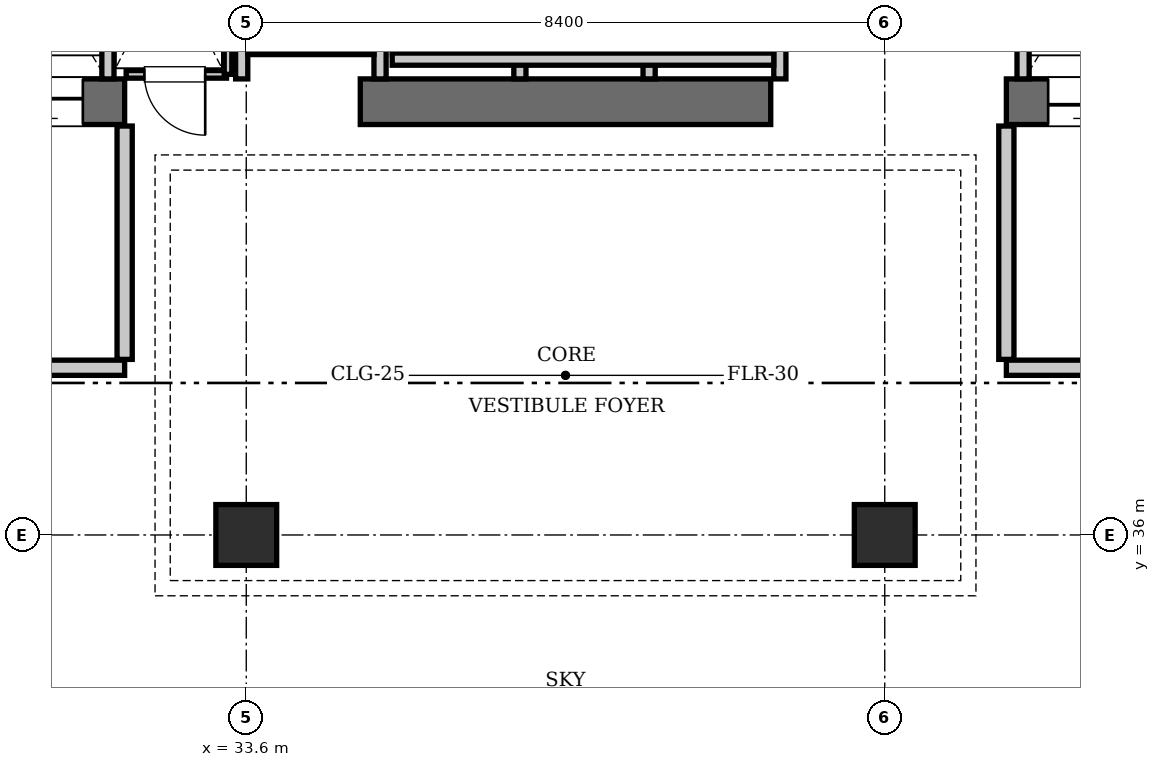
"""IFC4 building model, lengths in metres.
Left out: names, types, materials, properties, quantities, classifications, styles, units other than length and angle.
Written with IfcOpenShell. Run it as: python <this file> out.ifc"""

import sys

from ifc_helpers import new_model, si_unit, direction, frame, frame_2d, origin, origin_2d, place, context, subcontext, project, spatial, rectangle, extrude, element, fill, save


model = new_model("IFC4")
c1 = context("Model", 3, precision=1e-05, world=origin(), true_north=direction((0.0, 1.0)))
c2 = subcontext(c1, "Body", "Model", "MODEL_VIEW")
j1 = project(units=[si_unit("LENGTHUNIT", "METRE"), si_unit("PLANEANGLEUNIT", "RADIAN")], contexts=[c1])
p1 = place(None, origin())
s1 = spatial("IfcSite", under=j1, at=p1, CompositionType="ELEMENT")
p2 = place(p1, origin())
s2 = spatial("IfcBuilding", under=s1, at=p2, CompositionType="ELEMENT")
p3 = place(p2, frame((0.0, 0.0, 234.5)))
s3 = spatial("IfcBuildingStorey", under=s2, at=p3, CompositionType="ELEMENT", Elevation=234.5)
p4 = place(p3, frame((25.2, 41.7, 0.0), z_axis=(0.0, 0.0, 1.0), x_axis=(1.0, 0.0, 0.0)))
e1 = element("IfcWall", 1, at=p4, inside=s3, PredefinedType="SHEAR", context=c2, shape_type="SweptSolid", body=[
    extrude(rectangle(XDim=6.8, YDim=0.6, at=frame_2d((3.4, 0.0))), origin(), (0.0, 0.0, 1.0), 4.9),
])
p5 = place(p4, frame((1.65, 0.0, 0.0)))
e2 = element("IfcOpeningElement", 2, at=p5, cuts=e1, PredefinedType="OPENING", context=c2, shape_type="SweptSolid", body=[
    extrude(rectangle(XDim=1.15, YDim=2.15, at=frame_2d((0.575, 1.075))), frame((0.0, 0.31, 0.0), z_axis=(0.0, -1.0, 0.0), x_axis=(1.0, 0.0, 0.0)), (0.0, 0.0, 1.0), 0.62),
])
p6 = place(p4, frame((5.15, 0.0, 0.0)))
e3 = element("IfcOpeningElement", 3, at=p6, cuts=e1, PredefinedType="OPENING", context=c2, shape_type="SweptSolid", body=[
    extrude(rectangle(XDim=1.1, YDim=2.2, at=frame_2d((0.55, 1.1))), frame((0.0, 0.31, 0.0), z_axis=(0.0, -1.0, 0.0), x_axis=(1.0, 0.0, 0.0)), (0.0, 0.0, 1.0), 0.62),
])
p7 = place(p3, frame((35.1, 41.7, 0.0), z_axis=(0.0, 0.0, 1.0), x_axis=(1.0, 0.0, 0.0)))
e4 = element("IfcWall", 4, at=p7, inside=s3, PredefinedType="SHEAR", context=c2, shape_type="SweptSolid", body=[
    extrude(rectangle(XDim=5.4, YDim=0.6, at=frame_2d((2.7, 0.0))), origin(), (0.0, 0.0, 1.0), 4.9),
])
p8 = place(p3, frame((43.6, 41.7, 0.0), z_axis=(0.0, 0.0, 1.0), x_axis=(1.0, 0.0, 0.0)))
e5 = element("IfcWall", 5, at=p8, inside=s3, PredefinedType="SHEAR", context=c2, shape_type="SweptSolid", body=[
    extrude(rectangle(XDim=6.8, YDim=0.6, at=frame_2d((3.4, 0.0))), origin(), (0.0, 0.0, 1.0), 4.9),
])
p9 = place(p8, frame((3.9, 0.0, 0.0)))
e6 = element("IfcOpeningElement", 6, at=p9, cuts=e5, PredefinedType="OPENING", context=c2, shape_type="SweptSolid", body=[
    extrude(rectangle(XDim=1.15, YDim=2.15, at=frame_2d((0.575, 1.075))), frame((0.0, 0.31, 0.0), z_axis=(0.0, -1.0, 0.0), x_axis=(1.0, 0.0, 0.0)), (0.0, 0.0, 1.0), 0.62),
])
p10 = place(p8, frame((0.55, 0.0, 0.0)))
e7 = element("IfcOpeningElement", 7, at=p10, cuts=e5, PredefinedType="OPENING", context=c2, shape_type="SweptSolid", body=[
    extrude(rectangle(XDim=1.1, YDim=2.2, at=frame_2d((0.55, 1.1))), frame((0.0, 0.31, 0.0), z_axis=(0.0, -1.0, 0.0), x_axis=(1.0, 0.0, 0.0)), (0.0, 0.0, 1.0), 0.62),
])
for number, where, z_axis, x_axis in (
    (8, (33.6, 36.0, 0.0), (0.0, 0.0, 1.0), (1.0, 0.0, 0.0)),
    (9, (42.0, 36.0, 0.0), (0.0, 0.0, 1.0), (1.0, 0.0, 0.0)),
):
    element("IfcColumn", number, at=place(p3, frame(where, z_axis=z_axis, x_axis=x_axis)), inside=s3, PredefinedType="COLUMN", context=c2, shape_type="SweptSolid", body=[
        extrude(rectangle(XDim=0.8, YDim=0.8, at=origin_2d()), origin(), (0.0, 0.0, 1.0), 4.9),
    ])
for number, where, z_axis, x_axis in (
    (10, (31.78, 42.0, 0.0), (0.0, 0.0, 1.0), (0.0, 1.0, 0.0)),
    (11, (43.82, 42.0, 0.0), (0.0, 0.0, 1.0), (0.0, 1.0, 0.0)),
):
    element("IfcWall", number, at=place(p3, frame(where, z_axis=z_axis, x_axis=x_axis)), inside=s3, PredefinedType="SOLIDWALL", context=c2, shape_type="SweptSolid", body=[
        extrude(rectangle(XDim=2.74, YDim=0.16, at=frame_2d((1.37, 0.0))), origin(), (0.0, 0.0, 1.0), 4.66),
    ])
for number, where, z_axis, x_axis in (
    (12, (37.2, 42.0, 0.0), (0.0, 0.0, 1.0), (0.0, 1.0, 0.0)),
    (13, (38.9, 42.0, 0.0), (0.0, 0.0, 1.0), (0.0, 1.0, 0.0)),
    (14, (40.62, 42.0, 0.0), (0.0, 0.0, 1.0), (0.0, 1.0, 0.0)),
):
    element("IfcWall", number, at=place(p3, frame(where, z_axis=z_axis, x_axis=x_axis)), inside=s3, PredefinedType="SOLIDWALL", context=c2, shape_type="SweptSolid", body=[
        extrude(rectangle(XDim=2.35, YDim=0.16, at=frame_2d((1.175, 0.0))), origin(), (0.0, 0.0, 1.0), 4.66),
    ])
p11 = place(p3, frame((35.52, 42.26, 0.0), z_axis=(0.0, 0.0, 1.0), x_axis=(1.0, 0.0, 0.0)))
e15 = element("IfcWall", 15, at=p11, inside=s3, PredefinedType="SOLIDWALL", context=c2, shape_type="SweptSolid", body=[
    extrude(rectangle(XDim=5.02, YDim=0.16, at=frame_2d((2.51, 0.0))), origin(), (0.0, 0.0, 1.0), 4.66),
])
for number, where, z_axis, x_axis in (
    (16, (33.54, 42.0, 0.0), (0.0, 0.0, 1.0), (0.0, 1.0, 0.0)),
    (17, (35.36, 42.0, 0.0), (0.0, 0.0, 1.0), (0.0, 1.0, 0.0)),
):
    element("IfcWall", number, at=place(p3, frame(where, z_axis=z_axis, x_axis=x_axis)), inside=s3, PredefinedType="SOLIDWALL", context=c2, shape_type="SweptSolid", body=[
        extrude(rectangle(XDim=2.4, YDim=0.16, at=frame_2d((1.2, 0.0))), origin(), (0.0, 0.0, 1.0), 4.66),
    ])
p12 = place(p3, frame((33.62, 42.4, 0.0), z_axis=(0.0, 0.0, 1.0), x_axis=(1.0, 0.0, 0.0)))
e18 = element("IfcWall", 18, at=p12, inside=s3, PredefinedType="SOLIDWALL", context=c2, shape_type="SweptSolid", body=[
    extrude(rectangle(XDim=1.66, YDim=0.16, at=frame_2d((0.83, 0.0))), origin(), (0.0, 0.0, 1.0), 4.66),
])
p13 = place(p3, frame((26.2, 38.2, 0.0), z_axis=(0.0, 0.0, 1.0), x_axis=(1.0, 0.0, 0.0)))
e19 = element("IfcWall", 19, at=p13, inside=s3, PredefinedType="PARTITIONING", context=c2, shape_type="SweptSolid", body=[
    extrude(rectangle(XDim=5.8, YDim=0.2, at=frame_2d((2.9, 0.0))), origin(), (0.0, 0.0, 1.0), 4.66),
])
p14 = place(p13, frame((2.3, 0.0, 0.0)))
e20 = element("IfcOpeningElement", 20, at=p14, cuts=e19, PredefinedType="OPENING", context=c2, shape_type="SweptSolid", body=[
    extrude(rectangle(XDim=1.15, YDim=2.15, at=frame_2d((0.575, 1.075))), frame((0.0, 0.11, 0.0), z_axis=(0.0, -1.0, 0.0), x_axis=(1.0, 0.0, 0.0)), (0.0, 0.0, 1.0), 0.22),
])
p15 = place(p3, frame((32.0, 38.31, 0.0), z_axis=(0.0, 0.0, 1.0), x_axis=(0.0, 1.0, 0.0)))
e21 = element("IfcWall", 21, at=p15, inside=s3, PredefinedType="PARTITIONING", context=c2, shape_type="SweptSolid", body=[
    extrude(rectangle(XDim=3.07, YDim=0.2, at=frame_2d((1.535, 0.0))), origin(), (0.0, 0.0, 1.0), 4.66),
])
p16 = place(p3, frame((43.6, 38.2, 0.0), z_axis=(0.0, 0.0, 1.0), x_axis=(1.0, 0.0, 0.0)))
e22 = element("IfcWall", 22, at=p16, inside=s3, PredefinedType="PARTITIONING", context=c2, shape_type="SweptSolid", body=[
    extrude(rectangle(XDim=5.8, YDim=0.2, at=frame_2d((2.9, 0.0))), origin(), (0.0, 0.0, 1.0), 4.66),
])
p17 = place(p16, frame((2.3, 0.0, 0.0)))
e23 = element("IfcOpeningElement", 23, at=p17, cuts=e22, PredefinedType="OPENING", context=c2, shape_type="SweptSolid", body=[
    extrude(rectangle(XDim=1.15, YDim=2.15, at=frame_2d((0.575, 1.075))), frame((0.0, 0.11, 0.0), z_axis=(0.0, -1.0, 0.0), x_axis=(1.0, 0.0, 0.0)), (0.0, 0.0, 1.0), 0.22),
])
p18 = place(p3, frame((43.6, 38.31, 0.0), z_axis=(0.0, 0.0, 1.0), x_axis=(0.0, 1.0, 0.0)))
e24 = element("IfcWall", 24, at=p18, inside=s3, PredefinedType="PARTITIONING", context=c2, shape_type="SweptSolid", body=[
    extrude(rectangle(XDim=3.07, YDim=0.2, at=frame_2d((1.535, 0.0))), origin(), (0.0, 0.0, 1.0), 4.66),
])
p19 = place(p3, frame((32.02, 42.06, 0.0), z_axis=(0.0, 0.0, 1.0), x_axis=(1.0, 0.0, 0.0)))
e25 = element("IfcWall", 25, at=p19, inside=s3, PredefinedType="PARTITIONING", context=c2, shape_type="SweptSolid", body=[
    extrude(rectangle(XDim=1.32, YDim=0.1, at=frame_2d((0.66, 0.0))), origin(), (0.0, 0.0, 1.0), 4.66),
])
p20 = place(p19, frame((0.24, 0.0, 0.0)))
e26 = element("IfcOpeningElement", 26, at=p20, cuts=e25, PredefinedType="OPENING", context=c2, shape_type="SweptSolid", body=[
    extrude(rectangle(XDim=0.8, YDim=2.05, at=frame_2d((0.4, 1.025))), frame((0.0, 0.06, 0.0), z_axis=(0.0, -1.0, 0.0), x_axis=(1.0, 0.0, 0.0)), (0.0, 0.0, 1.0), 0.12),
])
p21 = place(p3, frame((33.36, 42.06, 0.0), z_axis=(0.0, 0.0, 1.0), x_axis=(0.0, 1.0, 0.0)))
e27 = element("IfcWall", 27, at=p21, inside=s3, PredefinedType="PARTITIONING", context=c2, shape_type="SweptSolid", body=[
    extrude(rectangle(XDim=2.88, YDim=0.1, at=frame_2d((1.44, 0.0))), origin(), (0.0, 0.0, 1.0), 4.66),
])
p22 = place(p6, frame((1.1, 0.0, 0.0), z_axis=(0.0, 0.0, 1.0), x_axis=(-1.0, 0.0, 0.0)))
e28 = element("IfcDoor", 28, at=p22, inside=s3, OperationType="SLIDING_TO_LEFT", PredefinedType="DOOR", context=c2, shape_type="SweptSolid", body=[
    extrude(rectangle(XDim=1.1, YDim=2.2, at=frame_2d((0.55, 1.1))), frame((0.0, 0.025, 0.0), z_axis=(0.0, -1.0, 0.0), x_axis=(1.0, 0.0, 0.0)), (0.0, 0.0, 1.0), 0.05),
])
fill(e3, e28)
p23 = place(p10, frame((1.1, 0.0, 0.0), z_axis=(0.0, 0.0, 1.0), x_axis=(-1.0, 0.0, 0.0)))
e29 = element("IfcDoor", 29, at=p23, inside=s3, OperationType="SLIDING_TO_LEFT", PredefinedType="DOOR", context=c2, shape_type="SweptSolid", body=[
    extrude(rectangle(XDim=1.1, YDim=2.2, at=frame_2d((0.55, 1.1))), frame((0.0, 0.025, 0.0), z_axis=(0.0, -1.0, 0.0), x_axis=(1.0, 0.0, 0.0)), (0.0, 0.0, 1.0), 0.05),
])
fill(e7, e29)
p24 = place(p20, frame((0.8, 0.0, 0.0), z_axis=(0.0, 0.0, 1.0), x_axis=(-1.0, 0.0, 0.0)))
e30 = element("IfcDoor", 30, at=p24, inside=s3, OperationType="SINGLE_SWING_LEFT", PredefinedType="DOOR", context=c2, shape_type="SweptSolid", body=[
    extrude(rectangle(XDim=0.8, YDim=2.05, at=frame_2d((0.4, 1.025))), frame((0.0, 0.025, 0.0), z_axis=(0.0, -1.0, 0.0), x_axis=(1.0, 0.0, 0.0)), (0.0, 0.0, 1.0), 0.05),
])
fill(e26, e30)
save(model, sys.argv[1])
